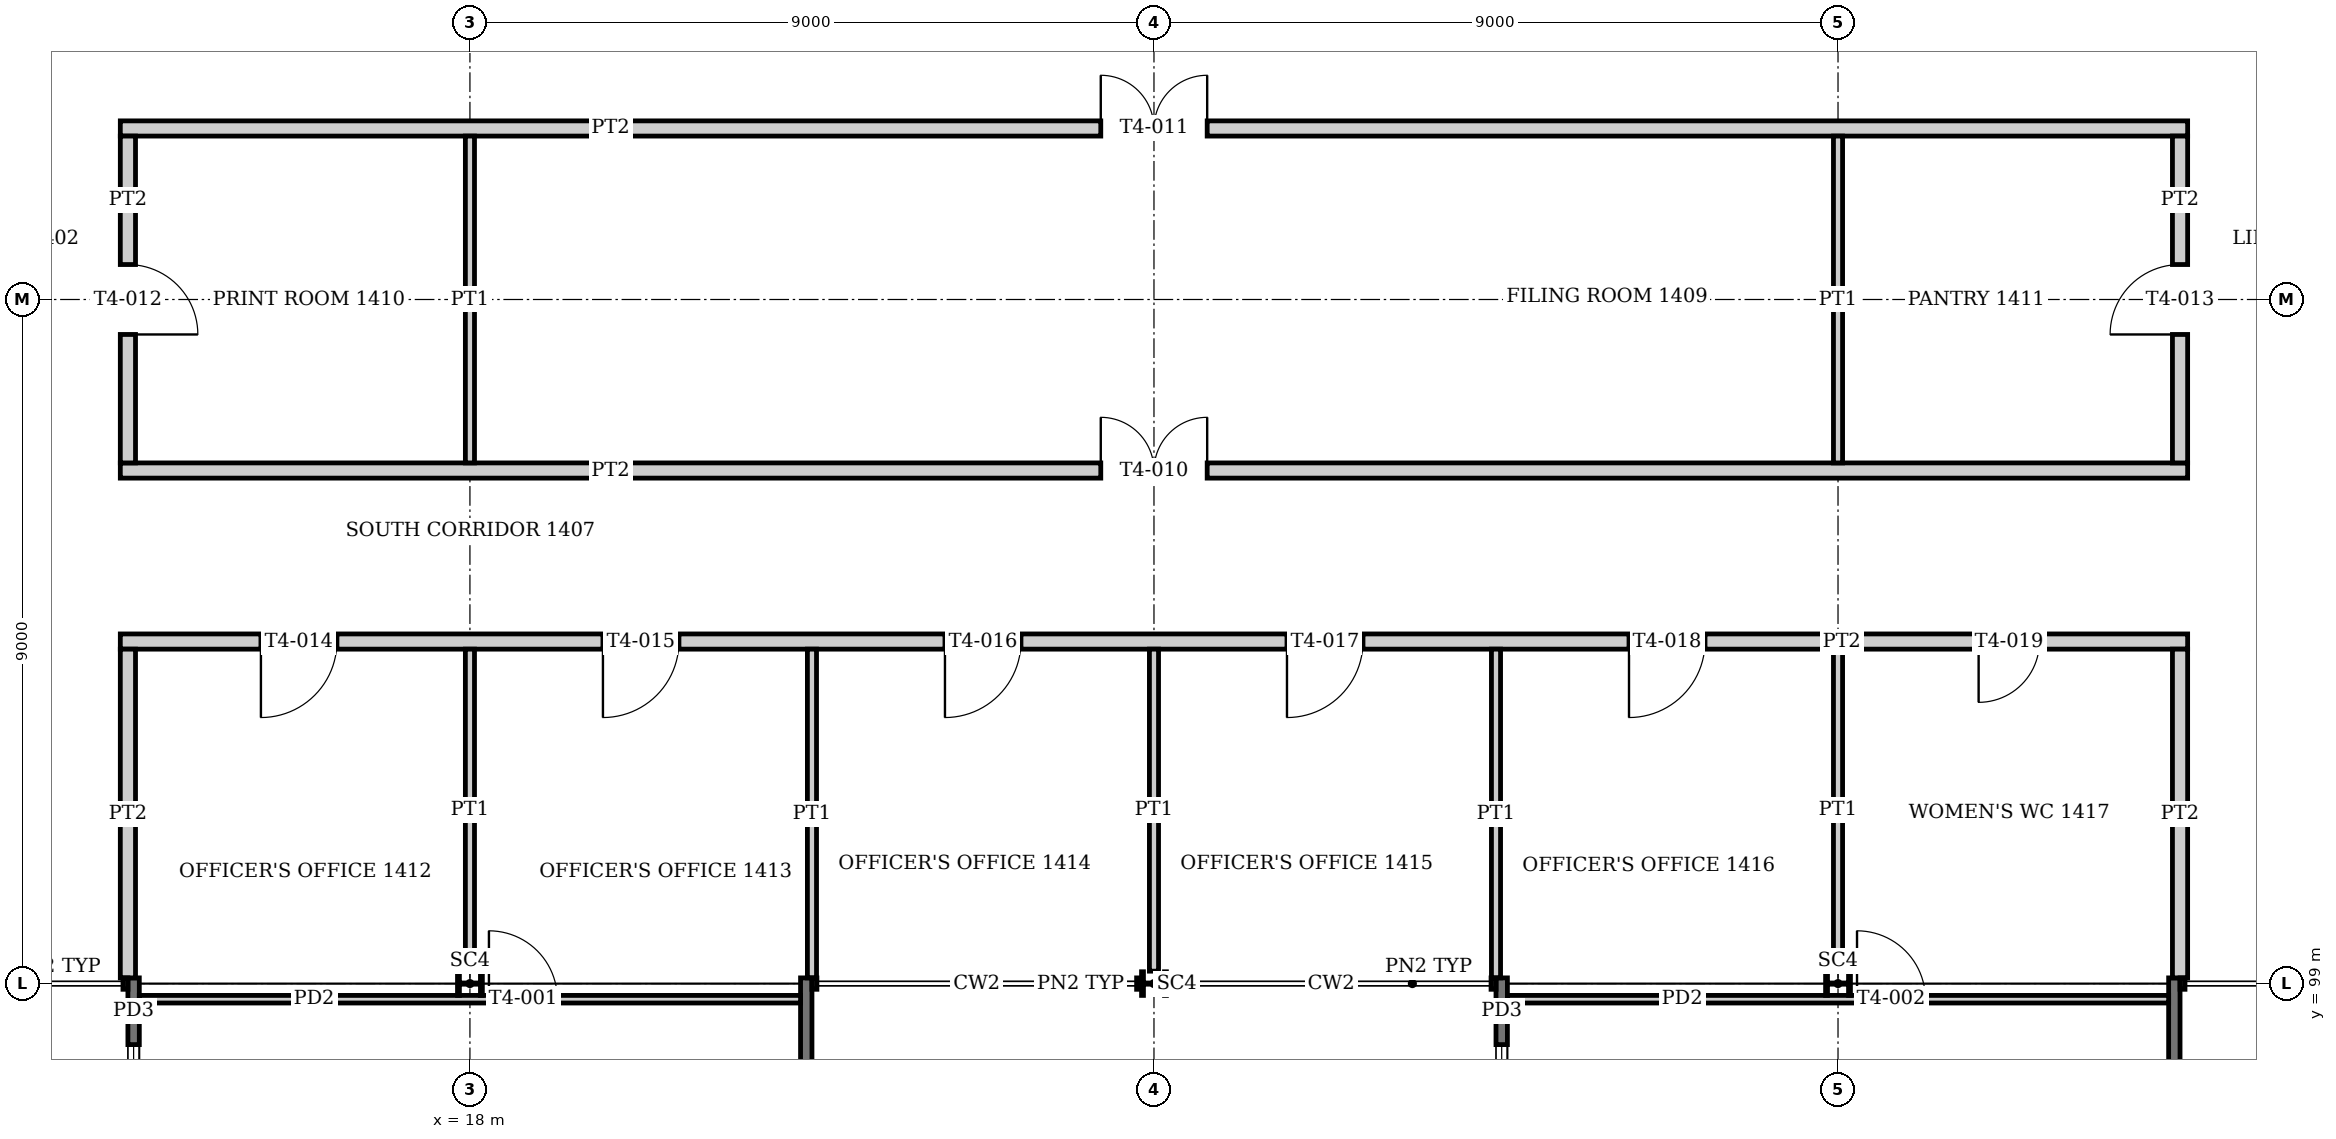
"""IFC4 building model, lengths in metres.
Left out: names, types, materials, properties, quantities, classifications, styles, units other than length and angle.
Written with IfcOpenShell. Run it as: python <this file> out.ifc"""

import sys

from ifc_helpers import new_model, si_unit, direction, frame, frame_2d, origin, origin_2d, place, context, subcontext, project, spatial, rectangle, i_section, extrude, element, fill, save


model = new_model("IFC4")
c1 = context("Model", 3, precision=1e-05, world=origin(), true_north=direction((0.0, 1.0)))
c2 = subcontext(c1, "Body", "Model", "MODEL_VIEW")
j1 = project(units=[si_unit("LENGTHUNIT", "METRE"), si_unit("PLANEANGLEUNIT", "RADIAN")], contexts=[c1])
p1 = place(None, origin())
s1 = spatial("IfcSite", under=j1, at=p1, CompositionType="ELEMENT")
p2 = place(p1, origin())
s2 = spatial("IfcBuilding", under=s1, at=p2, CompositionType="ELEMENT")
p3 = place(p2, frame((0.0, 0.0, 59.2)))
s3 = spatial("IfcBuildingStorey", under=s2, at=p3, CompositionType="ELEMENT", Elevation=59.2)
for number, where, z_axis, x_axis in (
    (1, (18.0, 99.0, 0.0), (0.0, 0.0, 1.0), (0.0, 1.0, 0.0)),
    (2, (27.0, 99.0, 0.0), (0.0, 0.0, 1.0), (0.0, 1.0, 0.0)),
    (3, (36.0, 99.0, 0.0), (0.0, 0.0, 1.0), (0.0, 1.0, 0.0)),
):
    element("IfcColumn", number, at=place(p3, frame(where, z_axis=z_axis, x_axis=x_axis)), inside=s3, PredefinedType="COLUMN", context=c2, shape_type="SweptSolid", body=[
        extrude(i_section(OverallWidth=0.311, OverallDepth=0.327, WebThickness=0.016, FlangeThickness=0.025, at=origin_2d()), origin(), (0.0, 0.0, 1.0), 4.0),
    ])
p4 = place(p3, frame((13.575, 95.55, -0.15), z_axis=(0.0, 0.0, 1.0), x_axis=(0.0, 1.0, 0.0)))
e4 = element("IfcWall", 4, at=p4, inside=s3, PredefinedType="SOLIDWALL", context=c2, shape_type="SweptSolid", body=[
    extrude(rectangle(XDim=3.525, YDim=0.15, at=frame_2d((1.762, 0.0))), origin(), (0.0, 0.0, 1.0), 2.75),
])
p5 = place(p4, frame((0.647, 0.0, 1.05)))
e5 = element("IfcOpeningElement", 5, at=p5, cuts=e4, PredefinedType="OPENING", context=c2, shape_type="SweptSolid", body=[
    extrude(rectangle(XDim=2.0, YDim=1.4, at=frame_2d((1.0, 0.7))), frame((0.0, 0.085, 0.0), z_axis=(0.0, -1.0, 0.0), x_axis=(1.0, 0.0, 0.0)), (0.0, 0.0, 1.0), 0.17),
])
p6 = place(p3, frame((22.425, 95.55, -0.15), z_axis=(0.0, 0.0, 1.0), x_axis=(0.0, 1.0, 0.0)))
e6 = element("IfcWall", 6, at=p6, inside=s3, PredefinedType="SOLIDWALL", context=c2, shape_type="SweptSolid", body=[
    extrude(rectangle(XDim=3.525, YDim=0.15, at=frame_2d((1.762, 0.0))), origin(), (0.0, 0.0, 1.0), 2.75),
])
p7 = place(p3, frame((13.65, 98.794, 0.0), z_axis=(0.0, 0.0, 1.0), x_axis=(1.0, 0.0, 0.0)))
e7 = element("IfcWall", 7, at=p7, inside=s3, PredefinedType="PARTITIONING", context=c2, shape_type="SweptSolid", body=[
    extrude(rectangle(XDim=8.7, YDim=0.1, at=frame_2d((4.35, 0.0))), origin(), (0.0, 0.0, 1.0), 2.6),
])
p8 = place(p7, frame((4.6, 0.0, 0.0)))
e8 = element("IfcOpeningElement", 8, at=p8, cuts=e7, PredefinedType="OPENING", context=c2, shape_type="SweptSolid", body=[
    extrude(rectangle(XDim=0.9, YDim=2.1, at=frame_2d((0.45, 1.05))), frame((0.0, 0.06, 0.0), z_axis=(0.0, -1.0, 0.0), x_axis=(1.0, 0.0, 0.0)), (0.0, 0.0, 1.0), 0.12),
])
p9 = place(p3, frame((31.575, 95.55, -0.15), z_axis=(0.0, 0.0, 1.0), x_axis=(0.0, 1.0, 0.0)))
e9 = element("IfcWall", 9, at=p9, inside=s3, PredefinedType="SOLIDWALL", context=c2, shape_type="SweptSolid", body=[
    extrude(rectangle(XDim=3.525, YDim=0.15, at=frame_2d((1.762, 0.0))), origin(), (0.0, 0.0, 1.0), 2.75),
])
p10 = place(p9, frame((0.647, 0.0, 1.05)))
e10 = element("IfcOpeningElement", 10, at=p10, cuts=e9, PredefinedType="OPENING", context=c2, shape_type="SweptSolid", body=[
    extrude(rectangle(XDim=2.0, YDim=1.4, at=frame_2d((1.0, 0.7))), frame((0.0, 0.085, 0.0), z_axis=(0.0, -1.0, 0.0), x_axis=(1.0, 0.0, 0.0)), (0.0, 0.0, 1.0), 0.17),
])
p11 = place(p3, frame((40.425, 95.55, -0.15), z_axis=(0.0, 0.0, 1.0), x_axis=(0.0, 1.0, 0.0)))
e11 = element("IfcWall", 11, at=p11, inside=s3, PredefinedType="SOLIDWALL", context=c2, shape_type="SweptSolid", body=[
    extrude(rectangle(XDim=3.525, YDim=0.15, at=frame_2d((1.762, 0.0))), origin(), (0.0, 0.0, 1.0), 2.75),
])
p12 = place(p3, frame((31.65, 98.794, 0.0), z_axis=(0.0, 0.0, 1.0), x_axis=(1.0, 0.0, 0.0)))
e12 = element("IfcWall", 12, at=p12, inside=s3, PredefinedType="PARTITIONING", context=c2, shape_type="SweptSolid", body=[
    extrude(rectangle(XDim=8.7, YDim=0.1, at=frame_2d((4.35, 0.0))), origin(), (0.0, 0.0, 1.0), 2.6),
])
p13 = place(p12, frame((4.6, 0.0, 0.0)))
e13 = element("IfcOpeningElement", 13, at=p13, cuts=e12, PredefinedType="OPENING", context=c2, shape_type="SweptSolid", body=[
    extrude(rectangle(XDim=0.9, YDim=2.1, at=frame_2d((0.45, 1.05))), frame((0.0, 0.06, 0.0), z_axis=(0.0, -1.0, 0.0), x_axis=(1.0, 0.0, 0.0)), (0.0, 0.0, 1.0), 0.12),
])
p14 = place(p3, frame((13.4, 103.5, 0.0), z_axis=(0.0, 0.0, 1.0), x_axis=(1.0, 0.0, 0.0)))
e14 = element("IfcWall", 14, at=p14, inside=s3, PredefinedType="PARTITIONING", context=c2, shape_type="SweptSolid", body=[
    extrude(rectangle(XDim=27.2, YDim=0.2, at=frame_2d((13.6, 0.0))), origin(), (0.0, 0.0, 1.0), 3.05),
])
p15 = place(p14, frame((1.85, 0.0, 0.0)))
e15 = element("IfcOpeningElement", 15, at=p15, cuts=e14, PredefinedType="OPENING", context=c2, shape_type="SweptSolid", body=[
    extrude(rectangle(XDim=1.0, YDim=2.1, at=frame_2d((0.5, 1.05))), frame((0.0, 0.11, 0.0), z_axis=(0.0, -1.0, 0.0), x_axis=(1.0, 0.0, 0.0)), (0.0, 0.0, 1.0), 0.22),
])
p16 = place(p14, frame((6.35, 0.0, 0.0)))
e16 = element("IfcOpeningElement", 16, at=p16, cuts=e14, PredefinedType="OPENING", context=c2, shape_type="SweptSolid", body=[
    extrude(rectangle(XDim=1.0, YDim=2.1, at=frame_2d((0.5, 1.05))), frame((0.0, 0.11, 0.0), z_axis=(0.0, -1.0, 0.0), x_axis=(1.0, 0.0, 0.0)), (0.0, 0.0, 1.0), 0.22),
])
p17 = place(p14, frame((10.85, 0.0, 0.0)))
e17 = element("IfcOpeningElement", 17, at=p17, cuts=e14, PredefinedType="OPENING", context=c2, shape_type="SweptSolid", body=[
    extrude(rectangle(XDim=1.0, YDim=2.1, at=frame_2d((0.5, 1.05))), frame((0.0, 0.11, 0.0), z_axis=(0.0, -1.0, 0.0), x_axis=(1.0, 0.0, 0.0)), (0.0, 0.0, 1.0), 0.22),
])
p18 = place(p14, frame((15.35, 0.0, 0.0)))
e18 = element("IfcOpeningElement", 18, at=p18, cuts=e14, PredefinedType="OPENING", context=c2, shape_type="SweptSolid", body=[
    extrude(rectangle(XDim=1.0, YDim=2.1, at=frame_2d((0.5, 1.05))), frame((0.0, 0.11, 0.0), z_axis=(0.0, -1.0, 0.0), x_axis=(1.0, 0.0, 0.0)), (0.0, 0.0, 1.0), 0.22),
])
p19 = place(p14, frame((19.85, 0.0, 0.0)))
e19 = element("IfcOpeningElement", 19, at=p19, cuts=e14, PredefinedType="OPENING", context=c2, shape_type="SweptSolid", body=[
    extrude(rectangle(XDim=1.0, YDim=2.1, at=frame_2d((0.5, 1.05))), frame((0.0, 0.11, 0.0), z_axis=(0.0, -1.0, 0.0), x_axis=(1.0, 0.0, 0.0)), (0.0, 0.0, 1.0), 0.22),
])
p20 = place(p14, frame((24.45, 0.0, 0.0)))
e20 = element("IfcOpeningElement", 20, at=p20, cuts=e14, PredefinedType="OPENING", context=c2, shape_type="SweptSolid", body=[
    extrude(rectangle(XDim=0.8, YDim=2.1, at=frame_2d((0.4, 1.05))), frame((0.0, 0.11, 0.0), z_axis=(0.0, -1.0, 0.0), x_axis=(1.0, 0.0, 0.0)), (0.0, 0.0, 1.0), 0.22),
])
p21 = place(p3, frame((13.4, 105.75, 0.0), z_axis=(0.0, 0.0, 1.0), x_axis=(1.0, 0.0, 0.0)))
e21 = element("IfcWall", 21, at=p21, inside=s3, PredefinedType="PARTITIONING", context=c2, shape_type="SweptSolid", body=[
    extrude(rectangle(XDim=27.2, YDim=0.2, at=frame_2d((13.6, 0.0))), origin(), (0.0, 0.0, 1.0), 3.05),
])
p22 = place(p21, frame((12.9, 0.0, 0.0)))
e22 = element("IfcOpeningElement", 22, at=p22, cuts=e21, PredefinedType="OPENING", context=c2, shape_type="SweptSolid", body=[
    extrude(rectangle(XDim=1.4, YDim=2.1, at=frame_2d((0.7, 1.05))), frame((0.0, 0.11, 0.0), z_axis=(0.0, -1.0, 0.0), x_axis=(1.0, 0.0, 0.0)), (0.0, 0.0, 1.0), 0.22),
])
p23 = place(p3, frame((13.4, 110.25, 0.0), z_axis=(0.0, 0.0, 1.0), x_axis=(1.0, 0.0, 0.0)))
e23 = element("IfcWall", 23, at=p23, inside=s3, PredefinedType="PARTITIONING", context=c2, shape_type="SweptSolid", body=[
    extrude(rectangle(XDim=27.2, YDim=0.2, at=frame_2d((13.6, 0.0))), origin(), (0.0, 0.0, 1.0), 3.05),
])
p24 = place(p23, frame((12.9, 0.0, 0.0)))
e24 = element("IfcOpeningElement", 24, at=p24, cuts=e23, PredefinedType="OPENING", context=c2, shape_type="SweptSolid", body=[
    extrude(rectangle(XDim=1.4, YDim=2.1, at=frame_2d((0.7, 1.05))), frame((0.0, 0.11, 0.0), z_axis=(0.0, -1.0, 0.0), x_axis=(1.0, 0.0, 0.0)), (0.0, 0.0, 1.0), 0.22),
])
p25 = place(p3, frame((13.5, 99.075, 0.0), z_axis=(0.0, 0.0, 1.0), x_axis=(0.0, 1.0, 0.0)))
e25 = element("IfcWall", 25, at=p25, inside=s3, PredefinedType="PARTITIONING", context=c2, shape_type="SweptSolid", body=[
    extrude(rectangle(XDim=4.325, YDim=0.2, at=frame_2d((2.163, 0.0))), origin(), (0.0, 0.0, 1.0), 3.05),
])
p26 = place(p3, frame((13.5, 105.85, 0.0), z_axis=(0.0, 0.0, 1.0), x_axis=(0.0, 1.0, 0.0)))
e26 = element("IfcWall", 26, at=p26, inside=s3, PredefinedType="PARTITIONING", context=c2, shape_type="SweptSolid", body=[
    extrude(rectangle(XDim=4.3, YDim=0.2, at=frame_2d((2.15, 0.0))), origin(), (0.0, 0.0, 1.0), 3.05),
])
p27 = place(p26, frame((1.69, 0.0, 0.0)))
e27 = element("IfcOpeningElement", 27, at=p27, cuts=e26, PredefinedType="OPENING", context=c2, shape_type="SweptSolid", body=[
    extrude(rectangle(XDim=0.92, YDim=2.1, at=frame_2d((0.46, 1.05))), frame((0.0, 0.11, 0.0), z_axis=(0.0, -1.0, 0.0), x_axis=(1.0, 0.0, 0.0)), (0.0, 0.0, 1.0), 0.22),
])
p28 = place(p3, frame((18.0, 99.164, 0.0), z_axis=(0.0, 0.0, 1.0), x_axis=(0.0, 1.0, 0.0)))
e28 = element("IfcWall", 28, at=p28, inside=s3, PredefinedType="PARTITIONING", context=c2, shape_type="SweptSolid", body=[
    extrude(rectangle(XDim=4.236, YDim=0.12, at=frame_2d((2.118, 0.0))), origin(), (0.0, 0.0, 1.0), 3.05),
])
p29 = place(p3, frame((18.0, 105.85, 0.0), z_axis=(0.0, 0.0, 1.0), x_axis=(0.0, 1.0, 0.0)))
e29 = element("IfcWall", 29, at=p29, inside=s3, PredefinedType="PARTITIONING", context=c2, shape_type="SweptSolid", body=[
    extrude(rectangle(XDim=4.3, YDim=0.12, at=frame_2d((2.15, 0.0))), origin(), (0.0, 0.0, 1.0), 3.05),
])
p30 = place(p3, frame((22.5, 99.075, 0.0), z_axis=(0.0, 0.0, 1.0), x_axis=(0.0, 1.0, 0.0)))
e30 = element("IfcWall", 30, at=p30, inside=s3, PredefinedType="PARTITIONING", context=c2, shape_type="SweptSolid", body=[
    extrude(rectangle(XDim=4.325, YDim=0.12, at=frame_2d((2.163, 0.0))), origin(), (0.0, 0.0, 1.0), 3.05),
])
p31 = place(p3, frame((27.0, 99.164, 0.0), z_axis=(0.0, 0.0, 1.0), x_axis=(0.0, 1.0, 0.0)))
e31 = element("IfcWall", 31, at=p31, inside=s3, PredefinedType="PARTITIONING", context=c2, shape_type="SweptSolid", body=[
    extrude(rectangle(XDim=4.236, YDim=0.12, at=frame_2d((2.118, 0.0))), origin(), (0.0, 0.0, 1.0), 3.05),
])
p32 = place(p3, frame((31.5, 99.075, 0.0), z_axis=(0.0, 0.0, 1.0), x_axis=(0.0, 1.0, 0.0)))
e32 = element("IfcWall", 32, at=p32, inside=s3, PredefinedType="PARTITIONING", context=c2, shape_type="SweptSolid", body=[
    extrude(rectangle(XDim=4.325, YDim=0.12, at=frame_2d((2.163, 0.0))), origin(), (0.0, 0.0, 1.0), 3.05),
])
p33 = place(p3, frame((36.0, 99.164, 0.0), z_axis=(0.0, 0.0, 1.0), x_axis=(0.0, 1.0, 0.0)))
e33 = element("IfcWall", 33, at=p33, inside=s3, PredefinedType="PARTITIONING", context=c2, shape_type="SweptSolid", body=[
    extrude(rectangle(XDim=4.236, YDim=0.12, at=frame_2d((2.118, 0.0))), origin(), (0.0, 0.0, 1.0), 3.05),
])
p34 = place(p3, frame((36.0, 105.85, 0.0), z_axis=(0.0, 0.0, 1.0), x_axis=(0.0, 1.0, 0.0)))
e34 = element("IfcWall", 34, at=p34, inside=s3, PredefinedType="PARTITIONING", context=c2, shape_type="SweptSolid", body=[
    extrude(rectangle(XDim=4.3, YDim=0.12, at=frame_2d((2.15, 0.0))), origin(), (0.0, 0.0, 1.0), 3.05),
])
p35 = place(p3, frame((40.5, 99.075, 0.0), z_axis=(0.0, 0.0, 1.0), x_axis=(0.0, 1.0, 0.0)))
e35 = element("IfcWall", 35, at=p35, inside=s3, PredefinedType="PARTITIONING", context=c2, shape_type="SweptSolid", body=[
    extrude(rectangle(XDim=4.325, YDim=0.2, at=frame_2d((2.163, 0.0))), origin(), (0.0, 0.0, 1.0), 3.05),
])
p36 = place(p3, frame((40.5, 105.85, 0.0), z_axis=(0.0, 0.0, 1.0), x_axis=(0.0, 1.0, 0.0)))
e36 = element("IfcWall", 36, at=p36, inside=s3, PredefinedType="PARTITIONING", context=c2, shape_type="SweptSolid", body=[
    extrude(rectangle(XDim=4.3, YDim=0.2, at=frame_2d((2.15, 0.0))), origin(), (0.0, 0.0, 1.0), 3.05),
])
p37 = place(p36, frame((1.69, 0.0, 0.0)))
e37 = element("IfcOpeningElement", 37, at=p37, cuts=e36, PredefinedType="OPENING", context=c2, shape_type="SweptSolid", body=[
    extrude(rectangle(XDim=0.92, YDim=2.1, at=frame_2d((0.46, 1.05))), frame((0.0, 0.11, 0.0), z_axis=(0.0, -1.0, 0.0), x_axis=(1.0, 0.0, 0.0)), (0.0, 0.0, 1.0), 0.22),
])
p38 = place(p5, origin())
e38 = element("IfcWindow", 38, at=p38, inside=s3, PartitioningType="SINGLE_PANEL", PredefinedType="WINDOW", context=c2, shape_type="SweptSolid", body=[
    extrude(rectangle(XDim=2.0, YDim=1.4, at=frame_2d((1.0, 0.7))), frame((0.0, 0.03, 0.0), z_axis=(0.0, -1.0, 0.0), x_axis=(1.0, 0.0, 0.0)), (0.0, 0.0, 1.0), 0.06),
])
fill(e5, e38)
p39 = place(p8, origin())
e39 = element("IfcDoor", 39, at=p39, inside=s3, OperationType="SINGLE_SWING_LEFT", PredefinedType="DOOR", context=c2, shape_type="SweptSolid", body=[
    extrude(rectangle(XDim=0.9, YDim=2.1, at=frame_2d((0.45, 1.05))), frame((0.0, 0.025, 0.0), z_axis=(0.0, -1.0, 0.0), x_axis=(1.0, 0.0, 0.0)), (0.0, 0.0, 1.0), 0.05),
])
fill(e8, e39)
p40 = place(p10, origin())
e40 = element("IfcWindow", 40, at=p40, inside=s3, PartitioningType="SINGLE_PANEL", PredefinedType="WINDOW", context=c2, shape_type="SweptSolid", body=[
    extrude(rectangle(XDim=2.0, YDim=1.4, at=frame_2d((1.0, 0.7))), frame((0.0, 0.03, 0.0), z_axis=(0.0, -1.0, 0.0), x_axis=(1.0, 0.0, 0.0)), (0.0, 0.0, 1.0), 0.06),
])
fill(e10, e40)
p41 = place(p13, origin())
e41 = element("IfcDoor", 41, at=p41, inside=s3, OperationType="SINGLE_SWING_LEFT", PredefinedType="DOOR", context=c2, shape_type="SweptSolid", body=[
    extrude(rectangle(XDim=0.9, YDim=2.1, at=frame_2d((0.45, 1.05))), frame((0.0, 0.025, 0.0), z_axis=(0.0, -1.0, 0.0), x_axis=(1.0, 0.0, 0.0)), (0.0, 0.0, 1.0), 0.05),
])
fill(e13, e41)
p42 = place(p22, origin())
e42 = element("IfcDoor", 42, at=p42, inside=s3, OperationType="DOUBLE_DOOR_SINGLE_SWING", PredefinedType="DOOR", context=c2, shape_type="SweptSolid", body=[
    extrude(rectangle(XDim=1.4, YDim=2.1, at=frame_2d((0.7, 1.05))), frame((0.0, 0.025, 0.0), z_axis=(0.0, -1.0, 0.0), x_axis=(1.0, 0.0, 0.0)), (0.0, 0.0, 1.0), 0.05),
])
fill(e22, e42)
p43 = place(p24, origin())
e43 = element("IfcDoor", 43, at=p43, inside=s3, OperationType="DOUBLE_DOOR_SINGLE_SWING", PredefinedType="DOOR", context=c2, shape_type="SweptSolid", body=[
    extrude(rectangle(XDim=1.4, YDim=2.1, at=frame_2d((0.7, 1.05))), frame((0.0, 0.025, 0.0), z_axis=(0.0, -1.0, 0.0), x_axis=(1.0, 0.0, 0.0)), (0.0, 0.0, 1.0), 0.05),
])
fill(e24, e43)
p44 = place(p27, frame((0.92, 0.0, 0.0), z_axis=(0.0, 0.0, 1.0), x_axis=(-1.0, 0.0, 0.0)))
e44 = element("IfcDoor", 44, at=p44, inside=s3, OperationType="SINGLE_SWING_RIGHT", PredefinedType="DOOR", context=c2, shape_type="SweptSolid", body=[
    extrude(rectangle(XDim=0.92, YDim=2.1, at=frame_2d((0.46, 1.05))), frame((0.0, 0.025, 0.0), z_axis=(0.0, -1.0, 0.0), x_axis=(1.0, 0.0, 0.0)), (0.0, 0.0, 1.0), 0.05),
])
fill(e27, e44)
p45 = place(p37, origin())
e45 = element("IfcDoor", 45, at=p45, inside=s3, OperationType="SINGLE_SWING_LEFT", PredefinedType="DOOR", context=c2, shape_type="SweptSolid", body=[
    extrude(rectangle(XDim=0.92, YDim=2.1, at=frame_2d((0.46, 1.05))), frame((0.0, 0.025, 0.0), z_axis=(0.0, -1.0, 0.0), x_axis=(1.0, 0.0, 0.0)), (0.0, 0.0, 1.0), 0.05),
])
fill(e37, e45)
p46 = place(p15, frame((1.0, 0.0, 0.0), z_axis=(0.0, 0.0, 1.0), x_axis=(-1.0, 0.0, 0.0)))
e46 = element("IfcDoor", 46, at=p46, inside=s3, OperationType="SINGLE_SWING_RIGHT", PredefinedType="DOOR", context=c2, shape_type="SweptSolid", body=[
    extrude(rectangle(XDim=1.0, YDim=2.1, at=frame_2d((0.5, 1.05))), frame((0.0, 0.025, 0.0), z_axis=(0.0, -1.0, 0.0), x_axis=(1.0, 0.0, 0.0)), (0.0, 0.0, 1.0), 0.05),
])
fill(e15, e46)
p47 = place(p16, frame((1.0, 0.0, 0.0), z_axis=(0.0, 0.0, 1.0), x_axis=(-1.0, 0.0, 0.0)))
e47 = element("IfcDoor", 47, at=p47, inside=s3, OperationType="SINGLE_SWING_RIGHT", PredefinedType="DOOR", context=c2, shape_type="SweptSolid", body=[
    extrude(rectangle(XDim=1.0, YDim=2.1, at=frame_2d((0.5, 1.05))), frame((0.0, 0.025, 0.0), z_axis=(0.0, -1.0, 0.0), x_axis=(1.0, 0.0, 0.0)), (0.0, 0.0, 1.0), 0.05),
])
fill(e16, e47)
p48 = place(p17, frame((1.0, 0.0, 0.0), z_axis=(0.0, 0.0, 1.0), x_axis=(-1.0, 0.0, 0.0)))
e48 = element("IfcDoor", 48, at=p48, inside=s3, OperationType="SINGLE_SWING_RIGHT", PredefinedType="DOOR", context=c2, shape_type="SweptSolid", body=[
    extrude(rectangle(XDim=1.0, YDim=2.1, at=frame_2d((0.5, 1.05))), frame((0.0, 0.025, 0.0), z_axis=(0.0, -1.0, 0.0), x_axis=(1.0, 0.0, 0.0)), (0.0, 0.0, 1.0), 0.05),
])
fill(e17, e48)
p49 = place(p18, frame((1.0, 0.0, 0.0), z_axis=(0.0, 0.0, 1.0), x_axis=(-1.0, 0.0, 0.0)))
e49 = element("IfcDoor", 49, at=p49, inside=s3, OperationType="SINGLE_SWING_RIGHT", PredefinedType="DOOR", context=c2, shape_type="SweptSolid", body=[
    extrude(rectangle(XDim=1.0, YDim=2.1, at=frame_2d((0.5, 1.05))), frame((0.0, 0.025, 0.0), z_axis=(0.0, -1.0, 0.0), x_axis=(1.0, 0.0, 0.0)), (0.0, 0.0, 1.0), 0.05),
])
fill(e18, e49)
p50 = place(p19, frame((1.0, 0.0, 0.0), z_axis=(0.0, 0.0, 1.0), x_axis=(-1.0, 0.0, 0.0)))
e50 = element("IfcDoor", 50, at=p50, inside=s3, OperationType="SINGLE_SWING_RIGHT", PredefinedType="DOOR", context=c2, shape_type="SweptSolid", body=[
    extrude(rectangle(XDim=1.0, YDim=2.1, at=frame_2d((0.5, 1.05))), frame((0.0, 0.025, 0.0), z_axis=(0.0, -1.0, 0.0), x_axis=(1.0, 0.0, 0.0)), (0.0, 0.0, 1.0), 0.05),
])
fill(e19, e50)
p51 = place(p20, frame((0.8, 0.0, 0.0), z_axis=(0.0, 0.0, 1.0), x_axis=(-1.0, 0.0, 0.0)))
e51 = element("IfcDoor", 51, at=p51, inside=s3, OperationType="SINGLE_SWING_RIGHT", PredefinedType="DOOR", context=c2, shape_type="SweptSolid", body=[
    extrude(rectangle(XDim=0.8, YDim=2.1, at=frame_2d((0.4, 1.05))), frame((0.0, 0.025, 0.0), z_axis=(0.0, -1.0, 0.0), x_axis=(1.0, 0.0, 0.0)), (0.0, 0.0, 1.0), 0.05),
])
fill(e20, e51)
save(model, sys.argv[1])
